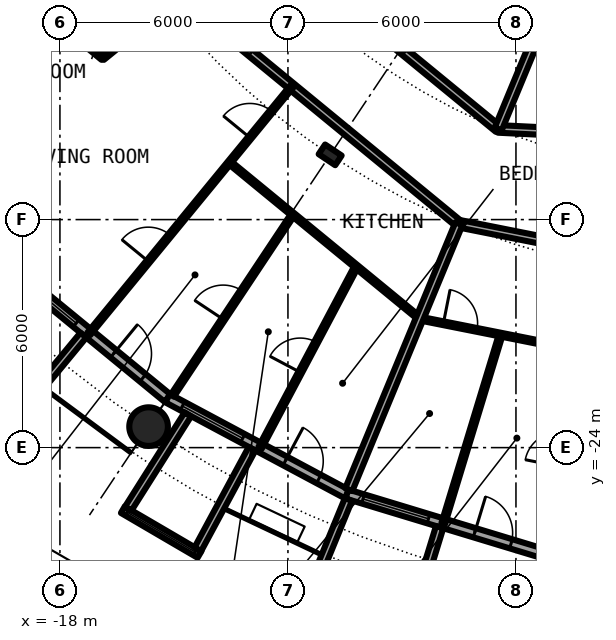
"""IFC4 building model, lengths in metres.
Left out: names, types, materials, properties, quantities, classifications, styles, units other than length and angle.
Written with IfcOpenShell. Run it as: python <this file> out.ifc"""

import sys

from ifc_helpers import new_model, si_unit, direction, frame, frame_2d, origin, origin_2d, place, context, subcontext, project, spatial, rectangle, circle, hollow_circle, i_section, extrude, element, fill, save


model = new_model("IFC4")
c1 = context("Model", 3, precision=1e-05, world=origin(), true_north=direction((0.0, 1.0)))
c2 = subcontext(c1, "Body", "Model", "MODEL_VIEW")
j1 = project(units=[si_unit("LENGTHUNIT", "METRE"), si_unit("PLANEANGLEUNIT", "RADIAN")], contexts=[c1])
p1 = place(None, origin())
s1 = spatial("IfcSite", under=j1, at=p1, CompositionType="ELEMENT")
p2 = place(p1, origin())
s2 = spatial("IfcBuilding", under=s1, at=p2, CompositionType="ELEMENT")
p3 = place(p2, frame((0.0, 0.0, 72.75)))
s3 = spatial("IfcBuildingStorey", under=s2, at=p3, CompositionType="ELEMENT", Elevation=72.75)
p4 = place(p3, frame((-15.667, -23.448, 0.0), z_axis=(0.0, 0.0, 1.0), x_axis=(1.0, 0.0, 0.0)))
e1 = element("IfcColumn", 1, at=p4, inside=s3, PredefinedType="COLUMN", context=c2, shape_type="SweptSolid", body=[
    extrude(hollow_circle(Radius=0.508, WallThickness=0.04, at=origin_2d()), origin(), (0.0, 0.0, 1.0), 3.05),
])
p5 = place(p3, frame((-10.889, -16.297, 0.0), z_axis=(0.0, 0.0, 1.0), x_axis=(-0.55557023302, -0.831469612303, 0.0)))
e2 = element("IfcColumn", 2, at=p5, inside=s3, PredefinedType="COLUMN", context=c2, shape_type="SweptSolid", body=[
    extrude(i_section(OverallWidth=0.306, OverallDepth=0.524, WebThickness=0.021, FlangeThickness=0.04, FilletRadius=0.027, at=origin_2d()), origin(), (0.0, 0.0, 1.0), 3.05),
])
p6 = place(p3, frame((-19.304, -19.304, 0.0), z_axis=(0.0, 0.0, 1.0), x_axis=(0.773019449054, -0.634382322723, 0.0)))
e3 = element("IfcWall", 3, at=p6, inside=s3, PredefinedType="SOLIDWALL", context=c2, shape_type="SweptSolid", body=[
    extrude(rectangle(XDim=5.352, YDim=0.25, at=frame_2d((2.676, 0.0))), origin(), (0.0, 0.0, 1.0), 2.7),
])
p7 = place(p6, frame((0.441, 0.0, 0.3)))
e4 = element("IfcOpeningElement", 4, at=p7, cuts=e3, PredefinedType="OPENING", context=c2, shape_type="SweptSolid", body=[
    extrude(rectangle(XDim=1.8, YDim=2.1, at=frame_2d((0.9, 1.05))), frame((0.0, 0.135, 0.0), z_axis=(0.0, -1.0, 0.0), x_axis=(1.0, 0.0, 0.0)), (0.0, 0.0, 1.0), 0.27),
])
p8 = place(p6, frame((3.51, 0.0, 0.0)))
e5 = element("IfcOpeningElement", 5, at=p8, cuts=e3, PredefinedType="OPENING", context=c2, shape_type="SweptSolid", body=[
    extrude(rectangle(XDim=1.0, YDim=2.2, at=frame_2d((0.5, 1.1))), frame((0.0, 0.135, 0.0), z_axis=(0.0, -1.0, 0.0), x_axis=(1.0, 0.0, 0.0)), (0.0, 0.0, 1.0), 0.27),
])
p9 = place(p3, frame((-17.384, -21.041, -0.03), z_axis=(0.0, 0.0, 1.0), x_axis=(-0.63709551667, -0.770784861449, 0.0)))
e6 = element("IfcWall", 6, at=p9, inside=s3, PredefinedType="SOLIDWALL", context=c2, shape_type="SweptSolid", body=[
    extrude(rectangle(XDim=3.006, YDim=0.2, at=frame_2d((1.503, 0.0))), origin(), (0.0, 0.0, 1.0), 2.73),
])
p10 = place(p3, frame((-15.167, -22.699, 0.0), z_axis=(0.0, 0.0, 1.0), x_axis=(0.881915646801, -0.471407246368, 0.0)))
e7 = element("IfcWall", 7, at=p10, inside=s3, PredefinedType="SOLIDWALL", context=c2, shape_type="SweptSolid", body=[
    extrude(rectangle(XDim=5.352, YDim=0.25, at=frame_2d((2.676, 0.0))), origin(), (0.0, 0.0, 1.0), 2.7),
])
p11 = place(p10, frame((0.441, 0.0, 0.3)))
e8 = element("IfcOpeningElement", 8, at=p11, cuts=e7, PredefinedType="OPENING", context=c2, shape_type="SweptSolid", body=[
    extrude(rectangle(XDim=1.8, YDim=2.1, at=frame_2d((0.9, 1.05))), frame((0.0, 0.135, 0.0), z_axis=(0.0, -1.0, 0.0), x_axis=(1.0, 0.0, 0.0)), (0.0, 0.0, 1.0), 0.27),
])
p12 = place(p10, frame((3.51, 0.0, 0.0)))
e9 = element("IfcOpeningElement", 9, at=p12, cuts=e7, PredefinedType="OPENING", context=c2, shape_type="SweptSolid", body=[
    extrude(rectangle(XDim=1.0, YDim=2.2, at=frame_2d((0.5, 1.1))), frame((0.0, 0.135, 0.0), z_axis=(0.0, -1.0, 0.0), x_axis=(1.0, 0.0, 0.0)), (0.0, 0.0, 1.0), 0.27),
])
p13 = place(p3, frame((-16.344, -25.633, -0.03), z_axis=(0.0, 0.0, 1.0), x_axis=(0.863346521872, -0.504611517081, 0.0)))
e10 = element("IfcWall", 10, at=p13, inside=s3, PredefinedType="SOLIDWALL", context=c2, shape_type="SweptSolid", body=[
    extrude(rectangle(XDim=2.336, YDim=0.2, at=frame_2d((1.168, 0.0))), origin(), (0.0, 0.0, 1.0), 2.73),
])
p14 = place(p13, frame((0.128, 0.0, 0.33)))
e11 = element("IfcOpeningElement", 11, at=p14, cuts=e10, PredefinedType="OPENING", context=c2, shape_type="SweptSolid", body=[
    extrude(circle(Radius=1.04, at=frame_2d((1.04, 1.04))), frame((0.0, 0.11, 0.0), z_axis=(0.0, -1.0, 0.0), x_axis=(1.0, 0.0, 0.0)), (0.0, 0.0, 1.0), 0.22),
])
p15 = place(p3, frame((-14.635, -23.126, -0.03), z_axis=(0.0, 0.0, 1.0), x_axis=(-0.534437802731, -0.845207805816, 0.0)))
e12 = element("IfcWall", 12, at=p15, inside=s3, PredefinedType="SOLIDWALL", context=c2, shape_type="SweptSolid", body=[
    extrude(rectangle(XDim=2.932, YDim=0.2, at=frame_2d((1.466, 0.0))), origin(), (0.0, 0.0, 1.0), 2.73),
])
p16 = place(p3, frame((-12.945, -24.029, -0.03), z_axis=(0.0, 0.0, 1.0), x_axis=(-0.474424310775, -0.88029629861, 0.0)))
e13 = element("IfcWall", 13, at=p16, inside=s3, PredefinedType="SOLIDWALL", context=c2, shape_type="SweptSolid", body=[
    extrude(rectangle(XDim=3.006, YDim=0.2, at=frame_2d((1.503, 0.0))), origin(), (0.0, 0.0, 1.0), 2.73),
])
p17 = place(p3, frame((-10.447, -25.222, 0.0), z_axis=(0.0, 0.0, 1.0), x_axis=(0.956965678721, -0.290201119486, 0.0)))
e14 = element("IfcWall", 14, at=p17, inside=s3, PredefinedType="SOLIDWALL", context=c2, shape_type="SweptSolid", body=[
    extrude(rectangle(XDim=5.351, YDim=0.25, at=frame_2d((2.676, 0.0))), origin(), (0.0, 0.0, 1.0), 2.7),
])
p18 = place(p17, frame((0.441, 0.0, 0.3)))
e15 = element("IfcOpeningElement", 15, at=p18, cuts=e14, PredefinedType="OPENING", context=c2, shape_type="SweptSolid", body=[
    extrude(rectangle(XDim=1.8, YDim=2.1, at=frame_2d((0.9, 1.05))), frame((0.0, 0.135, 0.0), z_axis=(0.0, -1.0, 0.0), x_axis=(1.0, 0.0, 0.0)), (0.0, 0.0, 1.0), 0.27),
])
p19 = place(p17, frame((3.51, 0.0, 0.0)))
e16 = element("IfcOpeningElement", 16, at=p19, cuts=e14, PredefinedType="OPENING", context=c2, shape_type="SweptSolid", body=[
    extrude(rectangle(XDim=1.0, YDim=2.2, at=frame_2d((0.5, 1.1))), frame((0.0, 0.135, 0.0), z_axis=(0.0, -1.0, 0.0), x_axis=(1.0, 0.0, 0.0)), (0.0, 0.0, 1.0), 0.27),
])
p20 = place(p3, frame((-10.409, -25.364, -0.03), z_axis=(0.0, 0.0, 1.0), x_axis=(-0.379509886562, -0.925187681501, 0.0)))
e17 = element("IfcWall", 17, at=p20, inside=s3, PredefinedType="SOLIDWALL", context=c2, shape_type="SweptSolid", body=[
    extrude(rectangle(XDim=2.883, YDim=0.2, at=frame_2d((1.441, 0.0))), origin(), (0.0, 0.0, 1.0), 2.73),
])
p21 = place(p3, frame((-8.009, -26.092, -0.03), z_axis=(0.0, 0.0, 1.0), x_axis=(-0.293406695073, -0.955987715029, 0.0)))
e18 = element("IfcWall", 18, at=p21, inside=s3, PredefinedType="SOLIDWALL", context=c2, shape_type="SweptSolid", body=[
    extrude(rectangle(XDim=3.006, YDim=0.2, at=frame_2d((1.503, 0.0))), origin(), (0.0, 0.0, 1.0), 2.73),
])
p22 = place(p3, frame((-8.536, -20.603, 0.0), z_axis=(0.0, 0.0, 1.0), x_axis=(0.980795826794, -0.195037294239, 0.0)))
e19 = element("IfcWall", 19, at=p22, inside=s3, PredefinedType="PARTITIONING", context=c2, shape_type="SweptSolid", body=[
    extrude(rectangle(XDim=4.352, YDim=0.1, at=frame_2d((2.176, 0.0))), origin(), (0.0, 0.0, 1.0), 2.7),
])
p23 = place(p22, frame((0.639, 0.0, 0.0)))
e20 = element("IfcOpeningElement", 20, at=p23, cuts=e19, PredefinedType="OPENING", context=c2, shape_type="SweptSolid", body=[
    extrude(rectangle(XDim=0.9, YDim=2.3, at=frame_2d((0.45, 1.15))), frame((0.0, 0.06, 0.0), z_axis=(0.0, -1.0, 0.0), x_axis=(1.0, 0.0, 0.0)), (0.0, 0.0, 1.0), 0.12),
])
p24 = place(p3, frame((-18.542, -12.389, 0.0), z_axis=(0.0, 0.0, 1.0), x_axis=(0.772948171844, -0.634469166818, 0.0)))
e21 = element("IfcWall", 21, at=p24, inside=s3, PredefinedType="PARTITIONING", context=c2, shape_type="SweptSolid", body=[
    extrude(rectangle(XDim=2.158, YDim=0.1, at=frame_2d((1.079, 0.0))), origin(), (0.0, 0.0, 1.0), 2.7),
])
p25 = place(p3, frame((-13.538, -16.496, 0.0), z_axis=(0.0, 0.0, 1.0), x_axis=(0.773000340237, -0.634405606843, 0.0)))
e22 = element("IfcWall", 22, at=p25, inside=s3, PredefinedType="PARTITIONING", context=c2, shape_type="SweptSolid", body=[
    extrude(rectangle(XDim=6.474, YDim=0.1, at=frame_2d((3.237, 0.0))), origin(), (0.0, 0.0, 1.0), 2.7),
])
p26 = place(p3, frame((-7.501, -18.108, 0.0), z_axis=(0.0, 0.0, 1.0), x_axis=(0.980781515054, -0.195109250749, 0.0)))
e23 = element("IfcWall", 23, at=p26, inside=s3, PredefinedType="PARTITIONING", context=c2, shape_type="SweptSolid", body=[
    extrude(rectangle(XDim=7.648, YDim=0.2, at=frame_2d((3.824, 0.0))), origin(), (0.0, 0.0, 1.0), 2.38),
])
p27 = place(p26, frame((2.25, 0.0, 0.0)))
e24 = element("IfcOpeningElement", 24, at=p27, cuts=e23, PredefinedType="OPENING", context=c2, shape_type="SweptSolid", body=[
    extrude(rectangle(XDim=1.0, YDim=2.3, at=frame_2d((0.5, 1.15))), frame((0.0, 0.11, 0.0), z_axis=(0.0, -1.0, 0.0), x_axis=(1.0, 0.0, 0.0)), (0.0, 0.0, 1.0), 0.22),
])
p28 = place(p3, frame((-16.172, -10.99, 0.0), z_axis=(0.0, 0.0, 1.0), x_axis=(0.772669779479, -0.634808169355, 0.0)))
e25 = element("IfcWall", 25, at=p28, inside=s3, PredefinedType="PARTITIONING", context=c2, shape_type="SweptSolid", body=[
    extrude(rectangle(XDim=11.208, YDim=0.2, at=frame_2d((5.604, 0.0))), origin(), (0.0, 0.0, 1.0), 2.38),
])
p29 = place(p28, frame((3.135, 0.0, 0.0)))
e26 = element("IfcOpeningElement", 26, at=p29, cuts=e25, PredefinedType="OPENING", context=c2, shape_type="SweptSolid", body=[
    extrude(rectangle(XDim=1.0, YDim=2.3, at=frame_2d((0.5, 1.15))), frame((0.0, 0.11, 0.0), z_axis=(0.0, -1.0, 0.0), x_axis=(1.0, 0.0, 0.0)), (0.0, 0.0, 1.0), 0.22),
])
p30 = place(p3, frame((-14.05, -9.392, 0.0), z_axis=(0.0, 0.0, 1.0), x_axis=(0.773074935257, -0.634314704605, 0.0)))
e27 = element("IfcWall", 27, at=p30, inside=s3, PredefinedType="PARTITIONING", context=c2, shape_type="SweptSolid", body=[
    extrude(rectangle(XDim=9.809, YDim=0.2, at=frame_2d((4.904, 0.0))), origin(), (0.0, 0.0, 1.0), 2.7),
])
p31 = place(p30, frame((4.402, 0.0, 0.0)))
e28 = element("IfcOpeningElement", 28, at=p31, cuts=e27, PredefinedType="OPENING", context=c2, shape_type="SweptSolid", body=[
    extrude(rectangle(XDim=1.0, YDim=2.3, at=frame_2d((0.5, 1.15))), frame((0.0, 0.11, 0.0), z_axis=(0.0, -1.0, 0.0), x_axis=(1.0, 0.0, 0.0)), (0.0, 0.0, 1.0), 0.22),
])
p32 = place(p3, frame((-6.469, -15.614, 0.0), z_axis=(0.0, 0.0, 1.0), x_axis=(0.998798520108, -0.049005267363, 0.0)))
e29 = element("IfcWall", 29, at=p32, inside=s3, PredefinedType="PARTITIONING", context=c2, shape_type="SweptSolid", body=[
    extrude(rectangle(XDim=11.389, YDim=0.2, at=frame_2d((5.694, 0.0))), origin(), (0.0, 0.0, 1.0), 2.7),
])
p33 = place(p32, frame((4.383, 0.0, 0.0)))
e30 = element("IfcOpeningElement", 30, at=p33, cuts=e29, PredefinedType="OPENING", context=c2, shape_type="SweptSolid", body=[
    extrude(rectangle(XDim=1.0, YDim=2.3, at=frame_2d((0.5, 1.15))), frame((0.0, 0.11, 0.0), z_axis=(0.0, -1.0, 0.0), x_axis=(1.0, 0.0, 0.0)), (0.0, 0.0, 1.0), 0.22),
])
p34 = place(p3, frame((-22.595, -15.097, 0.0), z_axis=(0.0, 0.0, 1.0), x_axis=(0.831505405283, 0.555516661303, 0.0)))
e31 = element("IfcWall", 31, at=p34, inside=s3, PredefinedType="PARTITIONING", context=c2, shape_type="SweptSolid", body=[
    extrude(rectangle(XDim=7.312, YDim=0.2, at=frame_2d((3.656, 0.0))), origin(), (0.0, 0.0, 1.0), 2.7),
])
p35 = place(p3, frame((-17.24, -21.007, 0.0), z_axis=(0.0, 0.0, 1.0), x_axis=(0.634396151441, 0.77300810024, 0.0)))
e32 = element("IfcWall", 32, at=p35, inside=s3, PredefinedType="PARTITIONING", context=c2, shape_type="SweptSolid", body=[
    extrude(rectangle(XDim=8.419, YDim=0.1, at=frame_2d((4.209, 0.0))), origin(), (0.0, 0.0, 1.0), 2.7),
])
p36 = place(p35, frame((6.679, 0.0, 0.0)))
e33 = element("IfcOpeningElement", 33, at=p36, cuts=e32, PredefinedType="OPENING", context=c2, shape_type="SweptSolid", body=[
    extrude(rectangle(XDim=0.9, YDim=2.3, at=frame_2d((0.45, 1.15))), frame((0.0, 0.06, 0.0), z_axis=(0.0, -1.0, 0.0), x_axis=(1.0, 0.0, 0.0)), (0.0, 0.0, 1.0), 0.12),
])
p37 = place(p35, frame((2.468, 0.0, 0.0)))
e34 = element("IfcOpeningElement", 34, at=p37, cuts=e32, PredefinedType="OPENING", context=c2, shape_type="SweptSolid", body=[
    extrude(rectangle(XDim=0.9, YDim=2.3, at=frame_2d((0.45, 1.15))), frame((0.0, 0.06, 0.0), z_axis=(0.0, -1.0, 0.0), x_axis=(1.0, 0.0, 0.0)), (0.0, 0.0, 1.0), 0.12),
])
p38 = place(p3, frame((-16.874, -13.758, 0.0), z_axis=(0.0, 0.0, 1.0), x_axis=(0.774979608522, 0.631986239072, 0.0)))
e35 = element("IfcWall", 35, at=p38, inside=s3, PredefinedType="PARTITIONING", context=c2, shape_type="SweptSolid", body=[
    extrude(rectangle(XDim=2.636, YDim=0.1, at=frame_2d((1.318, 0.0))), origin(), (0.0, 0.0, 1.0), 2.7),
])
p39 = place(p38, frame((0.868, 0.0, 0.0)))
e36 = element("IfcOpeningElement", 36, at=p39, cuts=e35, PredefinedType="OPENING", context=c2, shape_type="SweptSolid", body=[
    extrude(rectangle(XDim=0.9, YDim=2.3, at=frame_2d((0.45, 1.15))), frame((0.0, 0.06, 0.0), z_axis=(0.0, -1.0, 0.0), x_axis=(1.0, 0.0, 0.0)), (0.0, 0.0, 1.0), 0.12),
])
p40 = place(p3, frame((-15.041, -22.632, 0.0), z_axis=(0.0, 0.0, 1.0), x_axis=(0.553637025191, 0.83275809473, 0.0)))
e37 = element("IfcWall", 37, at=p40, inside=s3, PredefinedType="PARTITIONING", context=c2, shape_type="SweptSolid", body=[
    extrude(rectangle(XDim=5.726, YDim=0.1, at=frame_2d((2.863, 0.0))), origin(), (0.0, 0.0, 1.0), 2.7),
])
p41 = place(p40, frame((2.412, 0.0, 0.0)))
e38 = element("IfcOpeningElement", 38, at=p41, cuts=e37, PredefinedType="OPENING", context=c2, shape_type="SweptSolid", body=[
    extrude(rectangle(XDim=0.9, YDim=2.3, at=frame_2d((0.45, 1.15))), frame((0.0, 0.06, 0.0), z_axis=(0.0, -1.0, 0.0), x_axis=(1.0, 0.0, 0.0)), (0.0, 0.0, 1.0), 0.12),
])
p42 = place(p3, frame((-12.734, -24.007, 0.0), z_axis=(0.0, 0.0, 1.0), x_axis=(0.468610030042, 0.883405139075, 0.0)))
e39 = element("IfcWall", 39, at=p42, inside=s3, PredefinedType="PARTITIONING", context=c2, shape_type="SweptSolid", body=[
    extrude(rectangle(XDim=5.403, YDim=0.1, at=frame_2d((2.702, 0.0))), origin(), (0.0, 0.0, 1.0), 2.7),
])
p43 = place(p42, frame((2.252, 0.0, 0.0)))
e40 = element("IfcOpeningElement", 40, at=p43, cuts=e39, PredefinedType="OPENING", context=c2, shape_type="SweptSolid", body=[
    extrude(rectangle(XDim=0.9, YDim=2.3, at=frame_2d((0.45, 1.15))), frame((0.0, 0.06, 0.0), z_axis=(0.0, -1.0, 0.0), x_axis=(1.0, 0.0, 0.0)), (0.0, 0.0, 1.0), 0.12),
])
p44 = place(p3, frame((-10.399, -25.106, 0.0), z_axis=(0.0, 0.0, 1.0), x_axis=(0.382600411313, 0.923913916587, 0.0)))
e41 = element("IfcWall", 41, at=p44, inside=s3, PredefinedType="PARTITIONING", context=c2, shape_type="SweptSolid", body=[
    extrude(rectangle(XDim=7.574, YDim=0.2, at=frame_2d((3.787, 0.0))), origin(), (0.0, 0.0, 1.0), 2.7),
])
p45 = place(p3, frame((-7.913, -25.997, 0.0), z_axis=(0.0, 0.0, 1.0), x_axis=(0.291264462755, 0.956642573136, 0.0)))
e42 = element("IfcWall", 42, at=p45, inside=s3, PredefinedType="PARTITIONING", context=c2, shape_type="SweptSolid", body=[
    extrude(rectangle(XDim=5.195, YDim=0.1, at=frame_2d((2.598, 0.0))), origin(), (0.0, 0.0, 1.0), 2.7),
])
p46 = place(p3, frame((-6.467, -15.614, 0.0), z_axis=(0.0, 0.0, 1.0), x_axis=(0.382646942224, 0.923894646378, 0.0)))
e43 = element("IfcWall", 43, at=p46, inside=s3, PredefinedType="PARTITIONING", context=c2, shape_type="SweptSolid", body=[
    extrude(rectangle(XDim=9.181, YDim=0.2, at=frame_2d((4.59, 0.0))), origin(), (0.0, 0.0, 1.0), 2.7),
])
p47 = place(p7, origin())
e44 = element("IfcWindow", 44, at=p47, inside=s3, PartitioningType="SINGLE_PANEL", PredefinedType="WINDOW", context=c2, shape_type="SweptSolid", body=[
    extrude(rectangle(XDim=1.8, YDim=2.1, at=frame_2d((0.9, 1.05))), frame((0.0, 0.03, 0.0), z_axis=(0.0, -1.0, 0.0), x_axis=(1.0, 0.0, 0.0)), (0.0, 0.0, 1.0), 0.06),
])
fill(e4, e44)
p48 = place(p8, origin())
e45 = element("IfcDoor", 45, at=p48, inside=s3, OperationType="SINGLE_SWING_LEFT", PredefinedType="DOOR", context=c2, shape_type="SweptSolid", body=[
    extrude(rectangle(XDim=1.0, YDim=2.2, at=frame_2d((0.5, 1.1))), frame((0.0, 0.025, 0.0), z_axis=(0.0, -1.0, 0.0), x_axis=(1.0, 0.0, 0.0)), (0.0, 0.0, 1.0), 0.05),
])
fill(e5, e45)
p49 = place(p11, origin())
e46 = element("IfcWindow", 46, at=p49, inside=s3, PartitioningType="SINGLE_PANEL", PredefinedType="WINDOW", context=c2, shape_type="SweptSolid", body=[
    extrude(rectangle(XDim=1.8, YDim=2.1, at=frame_2d((0.9, 1.05))), frame((0.0, 0.03, 0.0), z_axis=(0.0, -1.0, 0.0), x_axis=(1.0, 0.0, 0.0)), (0.0, 0.0, 1.0), 0.06),
])
fill(e8, e46)
p50 = place(p14, origin())
e47 = element("IfcWindow", 47, at=p50, inside=s3, PartitioningType="SINGLE_PANEL", PredefinedType="WINDOW", context=c2, shape_type="SweptSolid", body=[
    extrude(circle(Radius=1.04, at=frame_2d((1.04, 1.04))), frame((0.0, 0.03, 0.0), z_axis=(0.0, -1.0, 0.0), x_axis=(1.0, 0.0, 0.0)), (0.0, 0.0, 1.0), 0.06),
])
fill(e11, e47)
p51 = place(p12, origin())
e48 = element("IfcDoor", 48, at=p51, inside=s3, OperationType="SINGLE_SWING_LEFT", PredefinedType="DOOR", context=c2, shape_type="SweptSolid", body=[
    extrude(rectangle(XDim=1.0, YDim=2.2, at=frame_2d((0.5, 1.1))), frame((0.0, 0.025, 0.0), z_axis=(0.0, -1.0, 0.0), x_axis=(1.0, 0.0, 0.0)), (0.0, 0.0, 1.0), 0.05),
])
fill(e9, e48)
p52 = place(p18, origin())
e49 = element("IfcWindow", 49, at=p52, inside=s3, PartitioningType="SINGLE_PANEL", PredefinedType="WINDOW", context=c2, shape_type="SweptSolid", body=[
    extrude(rectangle(XDim=1.8, YDim=2.1, at=frame_2d((0.9, 1.05))), frame((0.0, 0.03, 0.0), z_axis=(0.0, -1.0, 0.0), x_axis=(1.0, 0.0, 0.0)), (0.0, 0.0, 1.0), 0.06),
])
fill(e15, e49)
p53 = place(p19, origin())
e50 = element("IfcDoor", 50, at=p53, inside=s3, OperationType="SINGLE_SWING_LEFT", PredefinedType="DOOR", context=c2, shape_type="SweptSolid", body=[
    extrude(rectangle(XDim=1.0, YDim=2.2, at=frame_2d((0.5, 1.1))), frame((0.0, 0.025, 0.0), z_axis=(0.0, -1.0, 0.0), x_axis=(1.0, 0.0, 0.0)), (0.0, 0.0, 1.0), 0.05),
])
fill(e16, e50)
p54 = place(p29, origin())
e51 = element("IfcDoor", 51, at=p54, inside=s3, OperationType="SINGLE_SWING_LEFT", PredefinedType="DOOR", context=c2, shape_type="SweptSolid", body=[
    extrude(rectangle(XDim=1.0, YDim=2.3, at=frame_2d((0.5, 1.15))), frame((0.0, 0.025, 0.0), z_axis=(0.0, -1.0, 0.0), x_axis=(1.0, 0.0, 0.0)), (0.0, 0.0, 1.0), 0.05),
])
fill(e26, e51)
p55 = place(p36, origin())
e52 = element("IfcDoor", 52, at=p55, inside=s3, OperationType="SINGLE_SWING_RIGHT", PredefinedType="DOOR", context=c2, shape_type="SweptSolid", body=[
    extrude(rectangle(XDim=0.9, YDim=2.3, at=frame_2d((0.45, 1.15))), frame((0.0, 0.025, 0.0), z_axis=(0.0, -1.0, 0.0), x_axis=(1.0, 0.0, 0.0)), (0.0, 0.0, 1.0), 0.05),
])
fill(e33, e52)
p56 = place(p37, origin())
e53 = element("IfcDoor", 53, at=p56, inside=s3, OperationType="SINGLE_SWING_LEFT", PredefinedType="DOOR", context=c2, shape_type="SweptSolid", body=[
    extrude(rectangle(XDim=0.9, YDim=2.3, at=frame_2d((0.45, 1.15))), frame((0.0, 0.025, 0.0), z_axis=(0.0, -1.0, 0.0), x_axis=(1.0, 0.0, 0.0)), (0.0, 0.0, 1.0), 0.05),
])
fill(e34, e53)
p57 = place(p41, origin())
e54 = element("IfcDoor", 54, at=p57, inside=s3, OperationType="SINGLE_SWING_LEFT", PredefinedType="DOOR", context=c2, shape_type="SweptSolid", body=[
    extrude(rectangle(XDim=0.9, YDim=2.3, at=frame_2d((0.45, 1.15))), frame((0.0, 0.025, 0.0), z_axis=(0.0, -1.0, 0.0), x_axis=(1.0, 0.0, 0.0)), (0.0, 0.0, 1.0), 0.05),
])
fill(e38, e54)
p58 = place(p43, origin())
e55 = element("IfcDoor", 55, at=p58, inside=s3, OperationType="SINGLE_SWING_LEFT", PredefinedType="DOOR", context=c2, shape_type="SweptSolid", body=[
    extrude(rectangle(XDim=0.9, YDim=2.3, at=frame_2d((0.45, 1.15))), frame((0.0, 0.025, 0.0), z_axis=(0.0, -1.0, 0.0), x_axis=(1.0, 0.0, 0.0)), (0.0, 0.0, 1.0), 0.05),
])
fill(e40, e55)
p59 = place(p23, origin())
e56 = element("IfcDoor", 56, at=p59, inside=s3, OperationType="SINGLE_SWING_LEFT", PredefinedType="DOOR", context=c2, shape_type="SweptSolid", body=[
    extrude(rectangle(XDim=0.9, YDim=2.3, at=frame_2d((0.45, 1.15))), frame((0.0, 0.025, 0.0), z_axis=(0.0, -1.0, 0.0), x_axis=(1.0, 0.0, 0.0)), (0.0, 0.0, 1.0), 0.05),
])
fill(e20, e56)
save(model, sys.argv[1])
